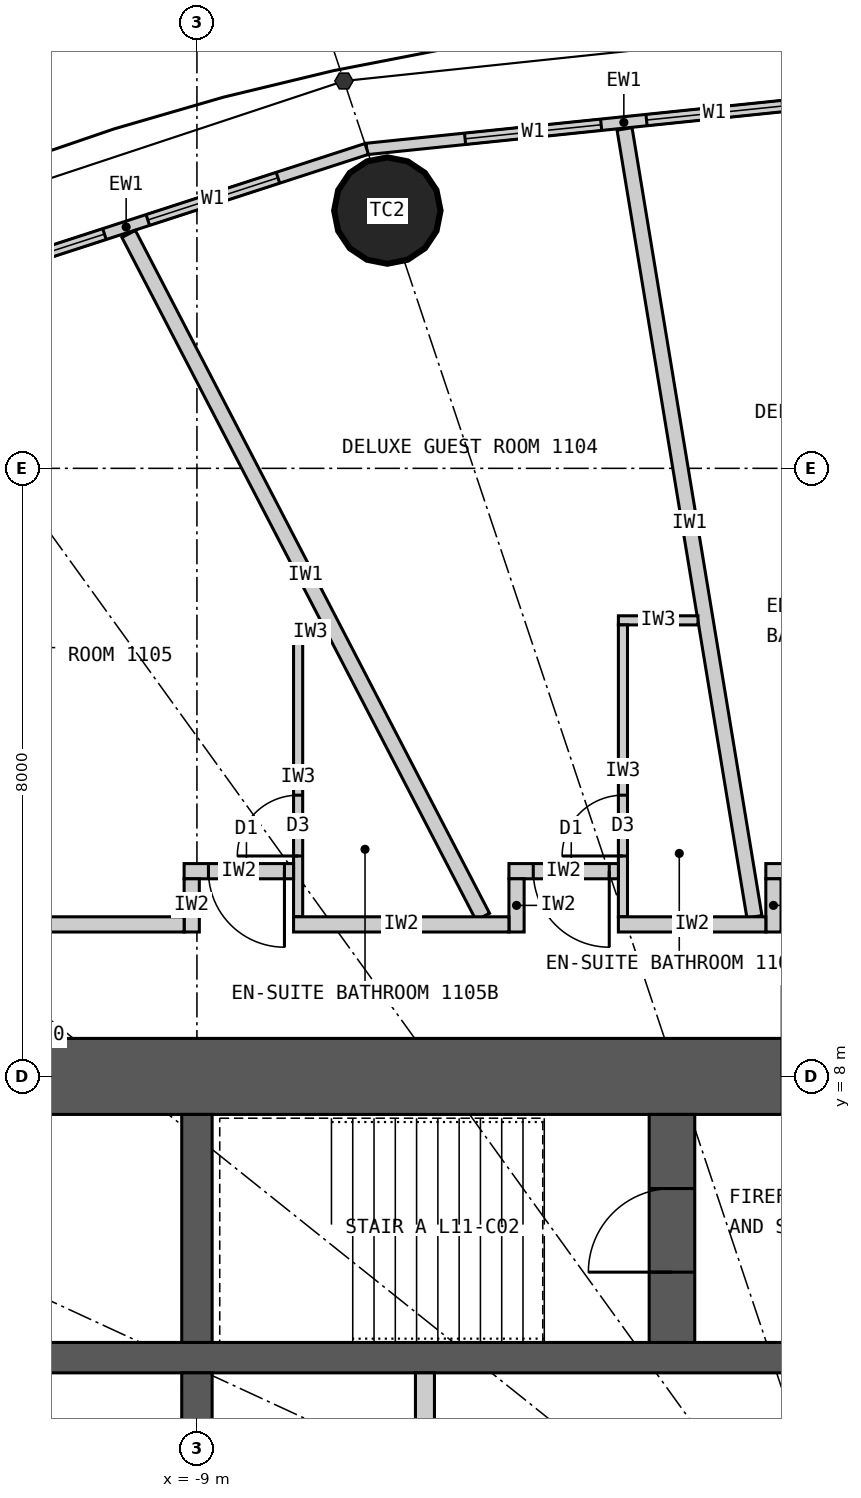
"""IFC4 building model, lengths in metres.
Left out: names, types, materials, properties, quantities, classifications, styles, units other than length and angle.
Written with IfcOpenShell. Run it as: python <this file> out.ifc"""

import sys

from ifc_helpers import new_model, si_unit, direction, frame, frame_2d, origin, origin_2d, place, context, subcontext, project, spatial, rectangle, circle, extrude, element, fill, save


model = new_model("IFC4")
c1 = context("Model", 3, precision=1e-05, world=origin(), true_north=direction((0.0, 1.0)))
c2 = subcontext(c1, "Body", "Model", "MODEL_VIEW")
j1 = project(units=[si_unit("LENGTHUNIT", "METRE"), si_unit("PLANEANGLEUNIT", "RADIAN")], contexts=[c1])
p1 = place(None, origin())
s1 = spatial("IfcSite", under=j1, at=p1, CompositionType="ELEMENT")
p2 = place(p1, origin())
s2 = spatial("IfcBuilding", under=s1, at=p2, CompositionType="ELEMENT")
p3 = place(p2, frame((0.0, 0.0, 50.7)))
s3 = spatial("IfcBuildingStorey", under=s2, at=p3, CompositionType="ELEMENT", Elevation=50.7)
p4 = place(p3, frame((-6.495, 19.391, 0.0), z_axis=(0.0, 0.0, 1.0), x_axis=(1.0, 0.0, 0.0)))
e1 = element("IfcColumn", 1, at=p4, inside=s3, PredefinedType="COLUMN", context=c2, shape_type="SweptSolid", body=[
    extrude(circle(Radius=0.7, at=origin_2d()), origin(), (0.0, 0.0, 1.0), 3.3),
])
p5 = place(p3, frame((-12.5, 8.0, 0.0), z_axis=(0.0, 0.0, 1.0), x_axis=(1.0, 0.0, 0.0)))
e2 = element("IfcWall", 2, at=p5, inside=s3, PredefinedType="SHEAR", context=c2, shape_type="SweptSolid", body=[
    extrude(rectangle(XDim=25.0, YDim=1.0, at=frame_2d((12.5, 0.0))), origin(), (0.0, 0.0, 1.0), 3.3),
])
p6 = place(p5, frame((11.2, 0.0, 0.0)))
e3 = element("IfcOpeningElement", 3, at=p6, cuts=e2, PredefinedType="OPENING", context=c2, shape_type="SweptSolid", body=[
    extrude(rectangle(XDim=1.2, YDim=2.2, at=frame_2d((0.6, 1.1))), frame((0.0, 0.51, 0.0), z_axis=(0.0, -1.0, 0.0), x_axis=(1.0, 0.0, 0.0)), (0.0, 0.0, 1.0), 1.02),
])
p7 = place(p5, frame((18.8, 0.0, 0.0)))
e4 = element("IfcOpeningElement", 4, at=p7, cuts=e2, PredefinedType="OPENING", context=c2, shape_type="SweptSolid", body=[
    extrude(rectangle(XDim=0.9, YDim=2.2, at=frame_2d((0.45, 1.1))), frame((0.0, 0.51, 0.0), z_axis=(0.0, -1.0, 0.0), x_axis=(1.0, 0.0, 0.0)), (0.0, 0.0, 1.0), 1.02),
])
p8 = place(p3, frame((-11.5, 4.3, 0.0), z_axis=(0.0, 0.0, 1.0), x_axis=(1.0, 0.0, 0.0)))
e5 = element("IfcWall", 5, at=p8, inside=s3, PredefinedType="SHEAR", context=c2, shape_type="SweptSolid", body=[
    extrude(rectangle(XDim=23.0, YDim=0.4, at=frame_2d((11.5, 0.0))), origin(), (0.0, 0.0, 1.0), 3.3),
])
p9 = place(p3, frame((-9.0, 4.5, 0.0), z_axis=(0.0, 0.0, 1.0), x_axis=(0.0, 1.0, 0.0)))
e6 = element("IfcWall", 6, at=p9, inside=s3, PredefinedType="SHEAR", context=c2, shape_type="SweptSolid", body=[
    extrude(rectangle(XDim=3.0, YDim=0.4, at=frame_2d((1.5, 0.0))), origin(), (0.0, 0.0, 1.0), 3.3),
])
p10 = place(p3, frame((-9.0, 1.75, 0.0), z_axis=(0.0, 0.0, 1.0), x_axis=(0.0, 1.0, 0.0)))
e7 = element("IfcWall", 7, at=p10, inside=s3, PredefinedType="SHEAR", context=c2, shape_type="SweptSolid", body=[
    extrude(rectangle(XDim=2.35, YDim=0.4, at=frame_2d((1.175, 0.0))), origin(), (0.0, 0.0, 1.0), 3.3),
])
p11 = place(p3, frame((-2.75, 4.5, 0.0), z_axis=(0.0, 0.0, 1.0), x_axis=(0.0, 1.0, 0.0)))
e8 = element("IfcWall", 8, at=p11, inside=s3, PredefinedType="SHEAR", context=c2, shape_type="SweptSolid", body=[
    extrude(rectangle(XDim=3.0, YDim=0.6, at=frame_2d((1.5, 0.0))), origin(), (0.0, 0.0, 1.0), 3.3),
])
p12 = place(p11, frame((0.925, 0.0, 0.0)))
e9 = element("IfcOpeningElement", 9, at=p12, cuts=e8, PredefinedType="OPENING", context=c2, shape_type="SweptSolid", body=[
    extrude(rectangle(XDim=1.1, YDim=2.2, at=frame_2d((0.55, 1.1))), frame((0.0, 0.31, 0.0), z_axis=(0.0, -1.0, 0.0), x_axis=(1.0, 0.0, 0.0)), (0.0, 0.0, 1.0), 0.62),
])
p13 = place(p3, frame((-6.0, 1.75, 0.0), z_axis=(0.0, 0.0, 1.0), x_axis=(0.0, 1.0, 0.0)))
e10 = element("IfcWall", 10, at=p13, inside=s3, PredefinedType="PARTITIONING", context=c2, shape_type="SweptSolid", body=[
    extrude(rectangle(XDim=2.35, YDim=0.25, at=frame_2d((1.175, 0.0))), origin(), (0.0, 0.0, 1.0), 3.3),
])
p14 = place(p3, frame((0.0, 20.9, 0.0), z_axis=(0.0, 0.0, 1.0), x_axis=(-0.994721394369, -0.102612609291, 0.0)))
e11 = element("IfcWall", 11, at=p14, inside=s3, PredefinedType="ELEMENTEDWALL", context=c2, shape_type="SweptSolid", body=[
    extrude(rectangle(XDim=6.802, YDim=0.15, at=frame_2d((3.401, 0.0))), origin(), (0.0, 0.0, 1.0), 3.12),
])
p15 = place(p14, frame((1.301, 0.0, 0.9)))
e12 = element("IfcOpeningElement", 12, at=p15, cuts=e11, PredefinedType="OPENING", context=c2, shape_type="SweptSolid", body=[
    extrude(rectangle(XDim=1.8, YDim=1.9, at=frame_2d((0.9, 0.95))), frame((0.0, 0.085, 0.0), z_axis=(0.0, -1.0, 0.0), x_axis=(1.0, 0.0, 0.0)), (0.0, 0.0, 1.0), 0.17),
])
p16 = place(p14, frame((3.701, 0.0, 0.9)))
e13 = element("IfcOpeningElement", 13, at=p16, cuts=e11, PredefinedType="OPENING", context=c2, shape_type="SweptSolid", body=[
    extrude(rectangle(XDim=1.8, YDim=1.9, at=frame_2d((0.9, 0.95))), frame((0.0, 0.085, 0.0), z_axis=(0.0, -1.0, 0.0), x_axis=(1.0, 0.0, 0.0)), (0.0, 0.0, 1.0), 0.17),
])
p17 = place(p3, frame((-6.766, 20.202, 0.0), z_axis=(0.0, 0.0, 1.0), x_axis=(-0.951137534625, -0.308767534285, 0.0)))
e14 = element("IfcWall", 14, at=p17, inside=s3, PredefinedType="ELEMENTEDWALL", context=c2, shape_type="SweptSolid", body=[
    extrude(rectangle(XDim=6.655, YDim=0.15, at=frame_2d((3.328, 0.0))), origin(), (0.0, 0.0, 1.0), 3.12),
])
p18 = place(p17, frame((1.228, 0.0, 0.9)))
e15 = element("IfcOpeningElement", 15, at=p18, cuts=e14, PredefinedType="OPENING", context=c2, shape_type="SweptSolid", body=[
    extrude(rectangle(XDim=1.8, YDim=1.9, at=frame_2d((0.9, 0.95))), frame((0.0, 0.085, 0.0), z_axis=(0.0, -1.0, 0.0), x_axis=(1.0, 0.0, 0.0)), (0.0, 0.0, 1.0), 0.17),
])
p19 = place(p17, frame((3.628, 0.0, 0.9)))
e16 = element("IfcOpeningElement", 16, at=p19, cuts=e14, PredefinedType="OPENING", context=c2, shape_type="SweptSolid", body=[
    extrude(rectangle(XDim=1.8, YDim=1.9, at=frame_2d((0.9, 0.95))), frame((0.0, 0.085, 0.0), z_axis=(0.0, -1.0, 0.0), x_axis=(1.0, 0.0, 0.0)), (0.0, 0.0, 1.0), 0.17),
])
p20 = place(p3, frame((-1.665, 10.1, 0.0), z_axis=(0.0, 0.0, 1.0), x_axis=(-0.162657606458, 0.986682574621, 0.0)))
e17 = element("IfcWall", 17, at=p20, inside=s3, PredefinedType="PARTITIONING", context=c2, shape_type="SweptSolid", body=[
    extrude(rectangle(XDim=10.505, YDim=0.2, at=frame_2d((5.252, 0.0))), origin(), (0.0, 0.0, 1.0), 3.12),
])
p21 = place(p3, frame((-5.239, 10.1, 0.0), z_axis=(0.0, 0.0, 1.0), x_axis=(-0.460422783389, 0.887699758103, 0.0)))
e18 = element("IfcWall", 18, at=p21, inside=s3, PredefinedType="PARTITIONING", context=c2, shape_type="SweptSolid", body=[
    extrude(rectangle(XDim=10.12, YDim=0.2, at=frame_2d((5.06, 0.0))), origin(), (0.0, 0.0, 1.0), 3.12),
])
p22 = place(p3, frame((-2.408, 14.0, 0.0), z_axis=(0.0, 0.0, 1.0), x_axis=(-1.0, 0.0, 0.0)))
e19 = element("IfcWall", 19, at=p22, inside=s3, PredefinedType="PARTITIONING", context=c2, shape_type="SweptSolid", body=[
    extrude(rectangle(XDim=1.047, YDim=0.12, at=frame_2d((0.523, 0.0))), origin(), (0.0, 0.0, 1.0), 3.12),
])
p23 = place(p3, frame((-3.395, 10.1, 0.0), z_axis=(0.0, 0.0, 1.0), x_axis=(0.0, 1.0, 0.0)))
e20 = element("IfcWall", 20, at=p23, inside=s3, PredefinedType="PARTITIONING", context=c2, shape_type="SweptSolid", body=[
    extrude(rectangle(XDim=3.84, YDim=0.12, at=frame_2d((1.92, 0.0))), origin(), (0.0, 0.0, 1.0), 3.12),
])
p24 = place(p23, frame((0.8, 0.0, 0.0)))
e21 = element("IfcOpeningElement", 21, at=p24, cuts=e20, PredefinedType="OPENING", context=c2, shape_type="SweptSolid", body=[
    extrude(rectangle(XDim=0.8, YDim=2.1, at=frame_2d((0.4, 1.05))), frame((0.0, 0.07, 0.0), z_axis=(0.0, -1.0, 0.0), x_axis=(1.0, 0.0, 0.0)), (0.0, 0.0, 1.0), 0.14),
])
p25 = place(p3, frame((-7.284, 13.85, 0.0), z_axis=(0.0, 0.0, 1.0), x_axis=(-1.0, 0.0, 0.0)))
e22 = element("IfcWall", 22, at=p25, inside=s3, PredefinedType="PARTITIONING", context=c2, shape_type="SweptSolid", body=[
    extrude(rectangle(XDim=0.445, YDim=0.12, at=frame_2d((0.222, 0.0))), origin(), (0.0, 0.0, 1.0), 3.12),
])
p26 = place(p3, frame((-7.669, 10.1, 0.0), z_axis=(0.0, 0.0, 1.0), x_axis=(0.0, 1.0, 0.0)))
e23 = element("IfcWall", 23, at=p26, inside=s3, PredefinedType="PARTITIONING", context=c2, shape_type="SweptSolid", body=[
    extrude(rectangle(XDim=3.69, YDim=0.12, at=frame_2d((1.845, 0.0))), origin(), (0.0, 0.0, 1.0), 3.12),
])
p27 = place(p26, frame((0.8, 0.0, 0.0)))
e24 = element("IfcOpeningElement", 24, at=p27, cuts=e23, PredefinedType="OPENING", context=c2, shape_type="SweptSolid", body=[
    extrude(rectangle(XDim=0.8, YDim=2.1, at=frame_2d((0.4, 1.05))), frame((0.0, 0.07, 0.0), z_axis=(0.0, -1.0, 0.0), x_axis=(1.0, 0.0, 0.0)), (0.0, 0.0, 1.0), 0.14),
])
p28 = place(p3, frame((-1.515, 10.7, 0.0), z_axis=(0.0, 0.0, 1.0), x_axis=(1.0, 0.0, 0.0)))
e25 = element("IfcWall", 25, at=p28, inside=s3, PredefinedType="PARTITIONING", context=c2, shape_type="SweptSolid", body=[
    extrude(rectangle(XDim=1.44, YDim=0.2, at=frame_2d((0.72, 0.0))), origin(), (0.0, 0.0, 1.0), 3.12),
])
p29 = place(p28, frame((0.32, 0.0, 0.0)))
e26 = element("IfcOpeningElement", 26, at=p29, cuts=e25, PredefinedType="OPENING", context=c2, shape_type="SweptSolid", body=[
    extrude(rectangle(XDim=1.0, YDim=2.2, at=frame_2d((0.5, 1.1))), frame((0.0, 0.11, 0.0), z_axis=(0.0, -1.0, 0.0), x_axis=(1.0, 0.0, 0.0)), (0.0, 0.0, 1.0), 0.22),
])
p30 = place(p3, frame((-1.415, 9.9, 0.0), z_axis=(0.0, 0.0, 1.0), x_axis=(0.0, 1.0, 0.0)))
e27 = element("IfcWall", 27, at=p30, inside=s3, PredefinedType="PARTITIONING", context=c2, shape_type="SweptSolid", body=[
    extrude(rectangle(XDim=0.7, YDim=0.2, at=frame_2d((0.35, 0.0))), origin(), (0.0, 0.0, 1.0), 3.12),
])
p31 = place(p3, frame((-4.895, 10.7, 0.0), z_axis=(0.0, 0.0, 1.0), x_axis=(1.0, 0.0, 0.0)))
e28 = element("IfcWall", 28, at=p31, inside=s3, PredefinedType="PARTITIONING", context=c2, shape_type="SweptSolid", body=[
    extrude(rectangle(XDim=1.44, YDim=0.2, at=frame_2d((0.72, 0.0))), origin(), (0.0, 0.0, 1.0), 3.12),
])
p32 = place(p31, frame((0.32, 0.0, 0.0)))
e29 = element("IfcOpeningElement", 29, at=p32, cuts=e28, PredefinedType="OPENING", context=c2, shape_type="SweptSolid", body=[
    extrude(rectangle(XDim=1.0, YDim=2.2, at=frame_2d((0.5, 1.1))), frame((0.0, 0.11, 0.0), z_axis=(0.0, -1.0, 0.0), x_axis=(1.0, 0.0, 0.0)), (0.0, 0.0, 1.0), 0.22),
])
p33 = place(p3, frame((-4.795, 9.9, 0.0), z_axis=(0.0, 0.0, 1.0), x_axis=(0.0, 1.0, 0.0)))
e30 = element("IfcWall", 30, at=p33, inside=s3, PredefinedType="PARTITIONING", context=c2, shape_type="SweptSolid", body=[
    extrude(rectangle(XDim=0.7, YDim=0.2, at=frame_2d((0.35, 0.0))), origin(), (0.0, 0.0, 1.0), 3.12),
])
p34 = place(p3, frame((-9.169, 10.7, 0.0), z_axis=(0.0, 0.0, 1.0), x_axis=(1.0, 0.0, 0.0)))
e31 = element("IfcWall", 31, at=p34, inside=s3, PredefinedType="PARTITIONING", context=c2, shape_type="SweptSolid", body=[
    extrude(rectangle(XDim=1.44, YDim=0.2, at=frame_2d((0.72, 0.0))), origin(), (0.0, 0.0, 1.0), 3.12),
])
p35 = place(p34, frame((0.32, 0.0, 0.0)))
e32 = element("IfcOpeningElement", 32, at=p35, cuts=e31, PredefinedType="OPENING", context=c2, shape_type="SweptSolid", body=[
    extrude(rectangle(XDim=1.0, YDim=2.2, at=frame_2d((0.5, 1.1))), frame((0.0, 0.11, 0.0), z_axis=(0.0, -1.0, 0.0), x_axis=(1.0, 0.0, 0.0)), (0.0, 0.0, 1.0), 0.22),
])
p36 = place(p3, frame((-9.069, 9.9, 0.0), z_axis=(0.0, 0.0, 1.0), x_axis=(0.0, 1.0, 0.0)))
e33 = element("IfcWall", 33, at=p36, inside=s3, PredefinedType="PARTITIONING", context=c2, shape_type="SweptSolid", body=[
    extrude(rectangle(XDim=0.7, YDim=0.2, at=frame_2d((0.35, 0.0))), origin(), (0.0, 0.0, 1.0), 3.12),
])
p37 = place(p3, frame((-14.1, 10.0, 0.0), z_axis=(0.0, 0.0, 1.0), x_axis=(1.0, 0.0, 0.0)))
e34 = element("IfcWall", 34, at=p37, inside=s3, PredefinedType="PARTITIONING", context=c2, shape_type="SweptSolid", body=[
    extrude(rectangle(XDim=4.931, YDim=0.2, at=frame_2d((2.466, 0.0))), origin(), (0.0, 0.0, 1.0), 3.12),
])
p38 = place(p3, frame((-7.729, 10.0, 0.0), z_axis=(0.0, 0.0, 1.0), x_axis=(1.0, 0.0, 0.0)))
e35 = element("IfcWall", 35, at=p38, inside=s3, PredefinedType="PARTITIONING", context=c2, shape_type="SweptSolid", body=[
    extrude(rectangle(XDim=2.833, YDim=0.2, at=frame_2d((1.417, 0.0))), origin(), (0.0, 0.0, 1.0), 3.12),
])
p39 = place(p3, frame((-3.455, 10.0, 0.0), z_axis=(0.0, 0.0, 1.0), x_axis=(1.0, 0.0, 0.0)))
e36 = element("IfcWall", 36, at=p39, inside=s3, PredefinedType="PARTITIONING", context=c2, shape_type="SweptSolid", body=[
    extrude(rectangle(XDim=1.94, YDim=0.2, at=frame_2d((0.97, 0.0))), origin(), (0.0, 0.0, 1.0), 3.12),
])
p40 = place(p15, origin())
e37 = element("IfcWindow", 37, at=p40, inside=s3, PartitioningType="SINGLE_PANEL", PredefinedType="WINDOW", context=c2, shape_type="SweptSolid", body=[
    extrude(rectangle(XDim=1.8, YDim=1.9, at=frame_2d((0.9, 0.95))), frame((0.0, 0.03, 0.0), z_axis=(0.0, -1.0, 0.0), x_axis=(1.0, 0.0, 0.0)), (0.0, 0.0, 1.0), 0.06),
])
fill(e12, e37)
p41 = place(p16, origin())
e38 = element("IfcWindow", 38, at=p41, inside=s3, PartitioningType="SINGLE_PANEL", PredefinedType="WINDOW", context=c2, shape_type="SweptSolid", body=[
    extrude(rectangle(XDim=1.8, YDim=1.9, at=frame_2d((0.9, 0.95))), frame((0.0, 0.03, 0.0), z_axis=(0.0, -1.0, 0.0), x_axis=(1.0, 0.0, 0.0)), (0.0, 0.0, 1.0), 0.06),
])
fill(e13, e38)
p42 = place(p18, origin())
e39 = element("IfcWindow", 39, at=p42, inside=s3, PartitioningType="SINGLE_PANEL", PredefinedType="WINDOW", context=c2, shape_type="SweptSolid", body=[
    extrude(rectangle(XDim=1.8, YDim=1.9, at=frame_2d((0.9, 0.95))), frame((0.0, 0.03, 0.0), z_axis=(0.0, -1.0, 0.0), x_axis=(1.0, 0.0, 0.0)), (0.0, 0.0, 1.0), 0.06),
])
fill(e15, e39)
p43 = place(p19, origin())
e40 = element("IfcWindow", 40, at=p43, inside=s3, PartitioningType="SINGLE_PANEL", PredefinedType="WINDOW", context=c2, shape_type="SweptSolid", body=[
    extrude(rectangle(XDim=1.8, YDim=1.9, at=frame_2d((0.9, 0.95))), frame((0.0, 0.03, 0.0), z_axis=(0.0, -1.0, 0.0), x_axis=(1.0, 0.0, 0.0)), (0.0, 0.0, 1.0), 0.06),
])
fill(e16, e40)
p44 = place(p24, origin())
e41 = element("IfcDoor", 41, at=p44, inside=s3, OperationType="SINGLE_SWING_LEFT", PredefinedType="DOOR", context=c2, shape_type="SweptSolid", body=[
    extrude(rectangle(XDim=0.8, YDim=2.1, at=frame_2d((0.4, 1.05))), frame((0.0, 0.025, 0.0), z_axis=(0.0, -1.0, 0.0), x_axis=(1.0, 0.0, 0.0)), (0.0, 0.0, 1.0), 0.05),
])
fill(e21, e41)
p45 = place(p32, origin())
e42 = element("IfcDoor", 42, at=p45, inside=s3, OperationType="SINGLE_SWING_RIGHT", PredefinedType="DOOR", context=c2, shape_type="SweptSolid", body=[
    extrude(rectangle(XDim=1.0, YDim=2.2, at=frame_2d((0.5, 1.1))), frame((0.0, 0.025, 0.0), z_axis=(0.0, -1.0, 0.0), x_axis=(1.0, 0.0, 0.0)), (0.0, 0.0, 1.0), 0.05),
])
fill(e29, e42)
p46 = place(p27, origin())
e43 = element("IfcDoor", 43, at=p46, inside=s3, OperationType="SINGLE_SWING_LEFT", PredefinedType="DOOR", context=c2, shape_type="SweptSolid", body=[
    extrude(rectangle(XDim=0.8, YDim=2.1, at=frame_2d((0.4, 1.05))), frame((0.0, 0.025, 0.0), z_axis=(0.0, -1.0, 0.0), x_axis=(1.0, 0.0, 0.0)), (0.0, 0.0, 1.0), 0.05),
])
fill(e24, e43)
p47 = place(p35, origin())
e44 = element("IfcDoor", 44, at=p47, inside=s3, OperationType="SINGLE_SWING_RIGHT", PredefinedType="DOOR", context=c2, shape_type="SweptSolid", body=[
    extrude(rectangle(XDim=1.0, YDim=2.2, at=frame_2d((0.5, 1.1))), frame((0.0, 0.025, 0.0), z_axis=(0.0, -1.0, 0.0), x_axis=(1.0, 0.0, 0.0)), (0.0, 0.0, 1.0), 0.05),
])
fill(e32, e44)
p48 = place(p12, origin())
e45 = element("IfcDoor", 45, at=p48, inside=s3, OperationType="SINGLE_SWING_LEFT", PredefinedType="DOOR", context=c2, shape_type="SweptSolid", body=[
    extrude(rectangle(XDim=1.1, YDim=2.2, at=frame_2d((0.55, 1.1))), frame((0.0, 0.025, 0.0), z_axis=(0.0, -1.0, 0.0), x_axis=(1.0, 0.0, 0.0)), (0.0, 0.0, 1.0), 0.05),
])
fill(e9, e45)
save(model, sys.argv[1])
